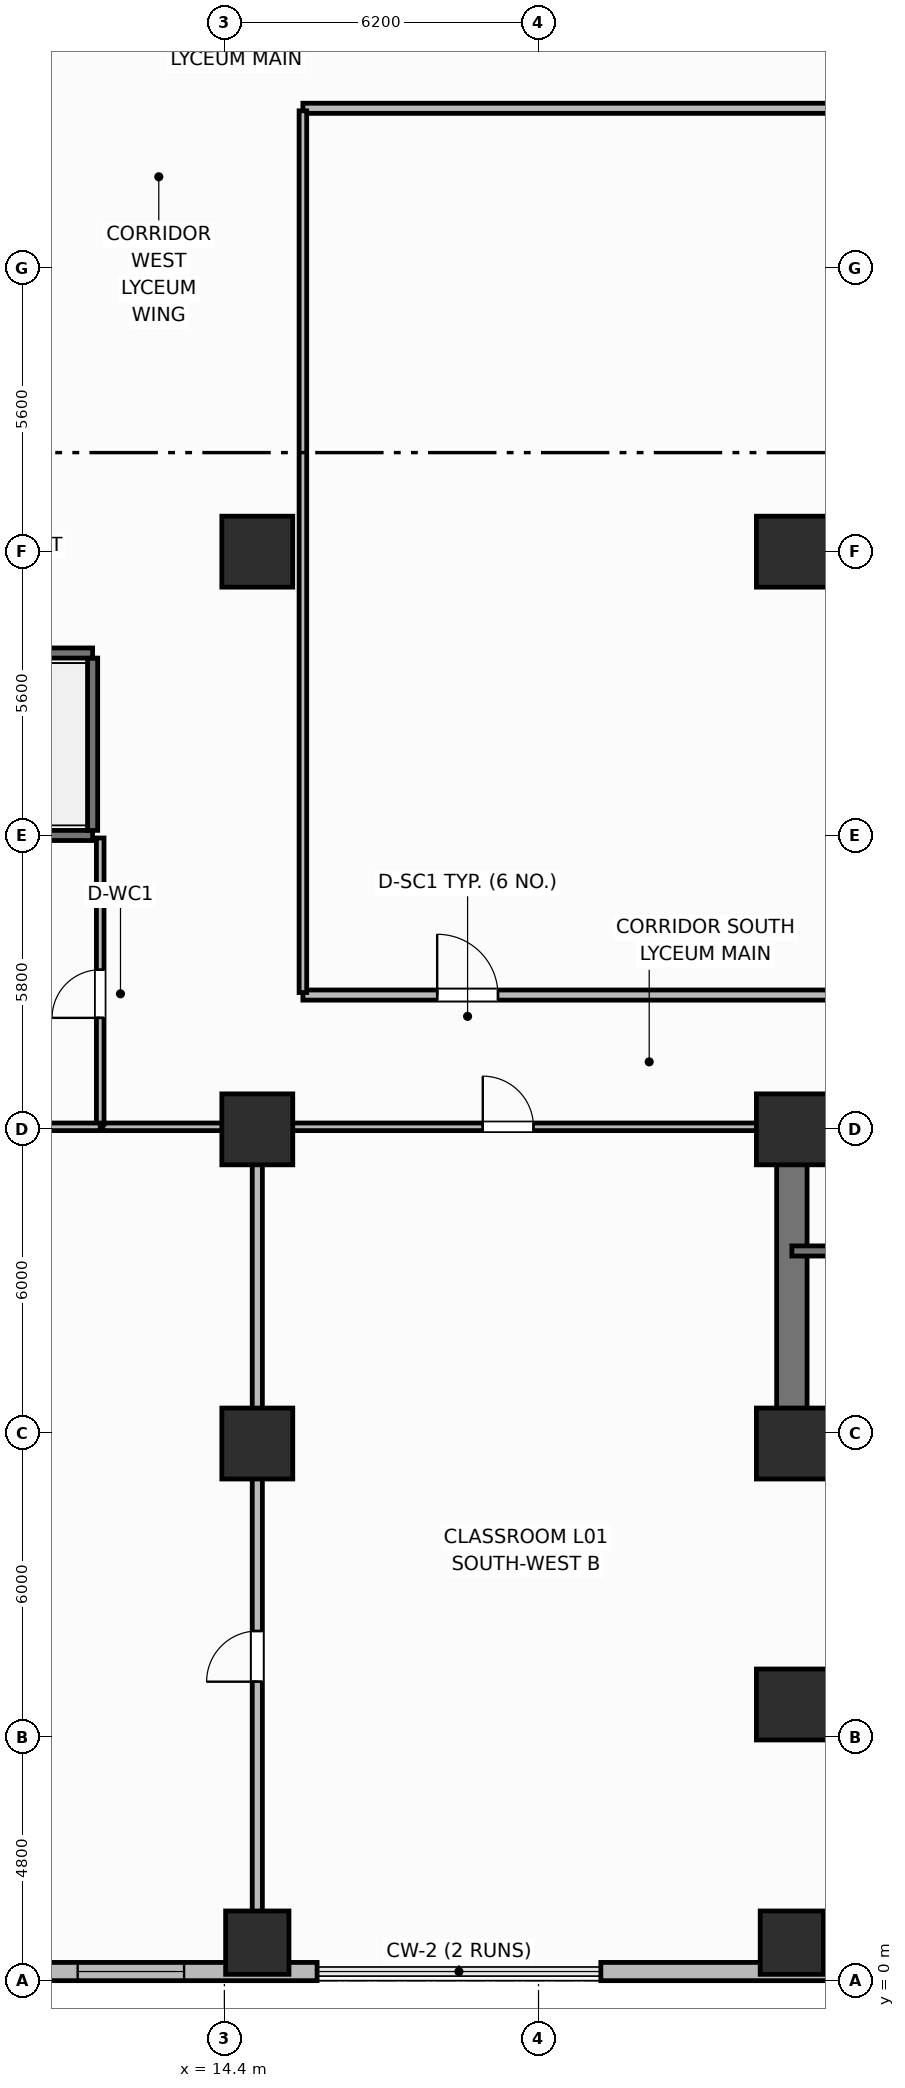
"""IFC4 building model, lengths in metres.
Left out: names, types, materials, properties, quantities, classifications, styles, units other than length and angle.
Written with IfcOpenShell. Run it as: python <this file> out.ifc"""

import sys

from ifc_helpers import new_model, si_unit, direction, frame, frame_2d, origin, origin_2d, place, context, subcontext, project, spatial, rectangle, extrude, element, fill, save


model = new_model("IFC4")
c1 = context("Model", 3, precision=1e-05, world=origin(), true_north=direction((0.0, 1.0)))
c2 = subcontext(c1, "Body", "Model", "MODEL_VIEW")
j1 = project(units=[si_unit("LENGTHUNIT", "METRE"), si_unit("PLANEANGLEUNIT", "RADIAN")], contexts=[c1])
p1 = place(None, origin())
s1 = spatial("IfcSite", under=j1, at=p1, CompositionType="ELEMENT")
p2 = place(p1, origin())
s2 = spatial("IfcBuilding", under=s1, at=p2, CompositionType="ELEMENT")
p3 = place(p2, frame((0.0, 0.0, 6.6)))
s3 = spatial("IfcBuildingStorey", under=s2, at=p3, CompositionType="ELEMENT", Elevation=6.6)
p4 = place(p3, frame((52.8, 10.6, 0.0), z_axis=(0.0, 0.0, 1.0), x_axis=(-1.0, 0.0, 0.0)))
e1 = element("IfcWall", 1, at=p4, inside=s3, PredefinedType="SHEAR", context=c2, shape_type="SweptSolid", body=[
    extrude(rectangle(XDim=27.2, YDim=0.6, at=frame_2d((13.6, 0.0))), origin(), (0.0, 0.0, 1.0), 4.5),
])
p5 = place(p3, frame((25.6, 10.9, 0.0), z_axis=(0.0, 0.0, 1.0), x_axis=(0.0, 1.0, 0.0)))
e2 = element("IfcWall", 2, at=p5, inside=s3, PredefinedType="SHEAR", context=c2, shape_type="SweptSolid", body=[
    extrude(rectangle(XDim=5.6, YDim=0.6, at=frame_2d((2.8, 0.0))), origin(), (0.0, 0.0, 1.0), 4.5),
])
p6 = place(p3, frame((25.6, 16.8, 0.0), z_axis=(0.0, 0.0, 1.0), x_axis=(1.0, 0.0, 0.0)))
e3 = element("IfcWall", 3, at=p6, inside=s3, PredefinedType="SHEAR", context=c2, shape_type="SweptSolid", body=[
    extrude(rectangle(XDim=27.2, YDim=0.6, at=frame_2d((13.6, 0.0))), origin(), (0.0, 0.0, 1.0), 4.5),
])
p7 = place(p6, frame((1.8, 0.0, 0.0)))
e4 = element("IfcOpeningElement", 4, at=p7, cuts=e3, PredefinedType="OPENING", context=c2, shape_type="SweptSolid", body=[
    extrude(rectangle(XDim=1.1, YDim=2.15, at=frame_2d((0.55, 1.075))), frame((0.0, 0.31, 0.0), z_axis=(0.0, -1.0, 0.0), x_axis=(1.0, 0.0, 0.0)), (0.0, 0.0, 1.0), 0.62),
])
p8 = place(p6, frame((5.6, 0.0, 0.0)))
e5 = element("IfcOpeningElement", 5, at=p8, cuts=e3, PredefinedType="OPENING", context=c2, shape_type="SweptSolid", body=[
    extrude(rectangle(XDim=0.85, YDim=2.1, at=frame_2d((0.425, 1.05))), frame((0.0, 0.31, 0.0), z_axis=(0.0, -1.0, 0.0), x_axis=(1.0, 0.0, 0.0)), (0.0, 0.0, 1.0), 0.62),
])
p9 = place(p6, frame((13.0, 0.0, 0.0)))
e6 = element("IfcOpeningElement", 6, at=p9, cuts=e3, PredefinedType="OPENING", context=c2, shape_type="SweptSolid", body=[
    extrude(rectangle(XDim=1.2, YDim=2.15, at=frame_2d((0.6, 1.075))), frame((0.0, 0.31, 0.0), z_axis=(0.0, -1.0, 0.0), x_axis=(1.0, 0.0, 0.0)), (0.0, 0.0, 1.0), 0.62),
])
p10 = place(p6, frame((20.4, 0.0, 0.0)))
e7 = element("IfcOpeningElement", 7, at=p10, cuts=e3, PredefinedType="OPENING", context=c2, shape_type="SweptSolid", body=[
    extrude(rectangle(XDim=1.3, YDim=2.2, at=frame_2d((0.65, 1.1))), frame((0.0, 0.31, 0.0), z_axis=(0.0, -1.0, 0.0), x_axis=(1.0, 0.0, 0.0)), (0.0, 0.0, 1.0), 0.62),
])
p11 = place(p6, frame((24.65, 0.0, 0.0)))
e8 = element("IfcOpeningElement", 8, at=p11, cuts=e3, PredefinedType="OPENING", context=c2, shape_type="SweptSolid", body=[
    extrude(rectangle(XDim=0.85, YDim=2.1, at=frame_2d((0.425, 1.05))), frame((0.0, 0.31, 0.0), z_axis=(0.0, -1.0, 0.0), x_axis=(1.0, 0.0, 0.0)), (0.0, 0.0, 1.0), 0.62),
])
for number, where, z_axis, x_axis in (
    (9, (25.6, 10.6, 0.0), (0.0, 0.0, 1.0), (1.0, 0.0, 0.0)),
    (10, (25.6, 16.8, 0.0), (0.0, 0.0, 1.0), (1.0, 0.0, 0.0)),
    (11, (25.6, 28.2, 0.0), (0.0, 0.0, 1.0), (1.0, 0.0, 0.0)),
):
    element("IfcColumn", number, at=place(p3, frame(where, z_axis=z_axis, x_axis=x_axis)), inside=s3, PredefinedType="COLUMN", context=c2, shape_type="SweptSolid", body=[
        extrude(rectangle(XDim=1.4, YDim=1.4, at=origin_2d()), origin(), (0.0, 0.0, 1.0), 4.5),
    ])
for number, where, z_axis, x_axis in (
    (12, (15.05, 0.75, 0.0), (0.0, 0.0, 1.0), (1.0, 0.0, 0.0)),
    (13, (25.6, 0.75, 0.0), (0.0, 0.0, 1.0), (1.0, 0.0, 0.0)),
):
    element("IfcColumn", number, at=place(p3, frame(where, z_axis=z_axis, x_axis=x_axis)), inside=s3, PredefinedType="COLUMN", context=c2, shape_type="SweptSolid", body=[
        extrude(rectangle(XDim=1.25, YDim=1.25, at=origin_2d()), origin(), (0.0, 0.0, 1.0), 4.5),
    ])
for number, where, z_axis, x_axis in (
    (14, (25.6, 5.45, 0.0), (0.0, 0.0, 1.0), (1.0, 0.0, 0.0)),
    (15, (15.05, 10.6, 0.0), (0.0, 0.0, 1.0), (1.0, 0.0, 0.0)),
    (16, (15.05, 16.8, 0.0), (0.0, 0.0, 1.0), (1.0, 0.0, 0.0)),
    (17, (15.05, 28.2, 0.0), (0.0, 0.0, 1.0), (1.0, 0.0, 0.0)),
):
    element("IfcColumn", number, at=place(p3, frame(where, z_axis=z_axis, x_axis=x_axis)), inside=s3, PredefinedType="COLUMN", context=c2, shape_type="SweptSolid", body=[
        extrude(rectangle(XDim=1.4, YDim=1.4, at=origin_2d()), origin(), (0.0, 0.0, 1.0), 4.5),
    ])
p12 = place(p3, frame((0.98, 0.18, 0.0), z_axis=(0.0, 0.0, 1.0), x_axis=(1.0, 0.0, 0.0)))
e18 = element("IfcWall", 18, at=p12, inside=s3, PredefinedType="SOLIDWALL", context=c2, shape_type="SweptSolid", body=[
    extrude(rectangle(XDim=15.25, YDim=0.36, at=frame_2d((7.625, 0.0))), origin(), (0.0, 0.0, 1.0), 3.48),
])
p13 = place(p12, frame((1.925, 0.0, 0.85)))
e19 = element("IfcOpeningElement", 19, at=p13, cuts=e18, PredefinedType="OPENING", context=c2, shape_type="SweptSolid", body=[
    extrude(rectangle(XDim=2.1, YDim=2.2, at=frame_2d((1.05, 1.1))), frame((0.0, 0.19, 0.0), z_axis=(0.0, -1.0, 0.0), x_axis=(1.0, 0.0, 0.0)), (0.0, 0.0, 1.0), 0.38),
])
p14 = place(p12, frame((7.625, 0.0, 0.85)))
e20 = element("IfcOpeningElement", 20, at=p14, cuts=e18, PredefinedType="OPENING", context=c2, shape_type="SweptSolid", body=[
    extrude(rectangle(XDim=2.1, YDim=2.2, at=frame_2d((1.05, 1.1))), frame((0.0, 0.19, 0.0), z_axis=(0.0, -1.0, 0.0), x_axis=(1.0, 0.0, 0.0)), (0.0, 0.0, 1.0), 0.38),
])
p15 = place(p12, frame((10.525, 0.0, 0.85)))
e21 = element("IfcOpeningElement", 21, at=p15, cuts=e18, PredefinedType="OPENING", context=c2, shape_type="SweptSolid", body=[
    extrude(rectangle(XDim=2.1, YDim=2.2, at=frame_2d((1.05, 1.1))), frame((0.0, 0.19, 0.0), z_axis=(0.0, -1.0, 0.0), x_axis=(1.0, 0.0, 0.0)), (0.0, 0.0, 1.0), 0.38),
])
p16 = place(p3, frame((21.83, 0.18, 0.0), z_axis=(0.0, 0.0, 1.0), x_axis=(1.0, 0.0, 0.0)))
e22 = element("IfcWall", 22, at=p16, inside=s3, PredefinedType="SOLIDWALL", context=c2, shape_type="SweptSolid", body=[
    extrude(rectangle(XDim=55.59, YDim=0.36, at=frame_2d((27.795, 0.0))), origin(), (0.0, 0.0, 1.0), 3.48),
])
p17 = place(p16, frame((5.029, 0.0, 0.85)))
e23 = element("IfcOpeningElement", 23, at=p17, cuts=e22, PredefinedType="OPENING", context=c2, shape_type="SweptSolid", body=[
    extrude(rectangle(XDim=2.1, YDim=2.2, at=frame_2d((1.05, 1.1))), frame((0.0, 0.19, 0.0), z_axis=(0.0, -1.0, 0.0), x_axis=(1.0, 0.0, 0.0)), (0.0, 0.0, 1.0), 0.38),
])
p18 = place(p16, frame((8.648, 0.0, 0.85)))
e24 = element("IfcOpeningElement", 24, at=p18, cuts=e22, PredefinedType="OPENING", context=c2, shape_type="SweptSolid", body=[
    extrude(rectangle(XDim=2.1, YDim=2.2, at=frame_2d((1.05, 1.1))), frame((0.0, 0.19, 0.0), z_axis=(0.0, -1.0, 0.0), x_axis=(1.0, 0.0, 0.0)), (0.0, 0.0, 1.0), 0.38),
])
p19 = place(p16, frame((12.268, 0.0, 0.85)))
e25 = element("IfcOpeningElement", 25, at=p19, cuts=e22, PredefinedType="OPENING", context=c2, shape_type="SweptSolid", body=[
    extrude(rectangle(XDim=2.1, YDim=2.2, at=frame_2d((1.05, 1.1))), frame((0.0, 0.19, 0.0), z_axis=(0.0, -1.0, 0.0), x_axis=(1.0, 0.0, 0.0)), (0.0, 0.0, 1.0), 0.38),
])
p20 = place(p16, frame((19.506, 0.0, 0.85)))
e26 = element("IfcOpeningElement", 26, at=p20, cuts=e22, PredefinedType="OPENING", context=c2, shape_type="SweptSolid", body=[
    extrude(rectangle(XDim=2.1, YDim=2.2, at=frame_2d((1.05, 1.1))), frame((0.0, 0.19, 0.0), z_axis=(0.0, -1.0, 0.0), x_axis=(1.0, 0.0, 0.0)), (0.0, 0.0, 1.0), 0.38),
])
p21 = place(p16, frame((23.126, 0.0, 0.85)))
e27 = element("IfcOpeningElement", 27, at=p21, cuts=e22, PredefinedType="OPENING", context=c2, shape_type="SweptSolid", body=[
    extrude(rectangle(XDim=2.1, YDim=2.2, at=frame_2d((1.05, 1.1))), frame((0.0, 0.19, 0.0), z_axis=(0.0, -1.0, 0.0), x_axis=(1.0, 0.0, 0.0)), (0.0, 0.0, 1.0), 0.38),
])
p22 = place(p16, frame((26.745, 0.0, 0.85)))
e28 = element("IfcOpeningElement", 28, at=p22, cuts=e22, PredefinedType="OPENING", context=c2, shape_type="SweptSolid", body=[
    extrude(rectangle(XDim=2.1, YDim=2.2, at=frame_2d((1.05, 1.1))), frame((0.0, 0.19, 0.0), z_axis=(0.0, -1.0, 0.0), x_axis=(1.0, 0.0, 0.0)), (0.0, 0.0, 1.0), 0.38),
])
p23 = place(p16, frame((33.984, 0.0, 0.85)))
e29 = element("IfcOpeningElement", 29, at=p23, cuts=e22, PredefinedType="OPENING", context=c2, shape_type="SweptSolid", body=[
    extrude(rectangle(XDim=2.1, YDim=2.2, at=frame_2d((1.05, 1.1))), frame((0.0, 0.19, 0.0), z_axis=(0.0, -1.0, 0.0), x_axis=(1.0, 0.0, 0.0)), (0.0, 0.0, 1.0), 0.38),
])
p24 = place(p16, frame((37.603, 0.0, 0.85)))
e30 = element("IfcOpeningElement", 30, at=p24, cuts=e22, PredefinedType="OPENING", context=c2, shape_type="SweptSolid", body=[
    extrude(rectangle(XDim=2.1, YDim=2.2, at=frame_2d((1.05, 1.1))), frame((0.0, 0.19, 0.0), z_axis=(0.0, -1.0, 0.0), x_axis=(1.0, 0.0, 0.0)), (0.0, 0.0, 1.0), 0.38),
])
p25 = place(p16, frame((44.842, 0.0, 0.85)))
e31 = element("IfcOpeningElement", 31, at=p25, cuts=e22, PredefinedType="OPENING", context=c2, shape_type="SweptSolid", body=[
    extrude(rectangle(XDim=2.1, YDim=2.2, at=frame_2d((1.05, 1.1))), frame((0.0, 0.19, 0.0), z_axis=(0.0, -1.0, 0.0), x_axis=(1.0, 0.0, 0.0)), (0.0, 0.0, 1.0), 0.38),
])
p26 = place(p16, frame((52.08, 0.0, 0.85)))
e32 = element("IfcOpeningElement", 32, at=p26, cuts=e22, PredefinedType="OPENING", context=c2, shape_type="SweptSolid", body=[
    extrude(rectangle(XDim=2.1, YDim=2.2, at=frame_2d((1.05, 1.1))), frame((0.0, 0.19, 0.0), z_axis=(0.0, -1.0, 0.0), x_axis=(1.0, 0.0, 0.0)), (0.0, 0.0, 1.0), 0.38),
])
p27 = place(p3, frame((25.6, 14.4, 0.0), z_axis=(0.0, 0.0, 1.0), x_axis=(1.0, 0.0, 0.0)))
e33 = element("IfcWall", 33, at=p27, inside=s3, PredefinedType="SHEAR", context=c2, shape_type="SweptSolid", body=[
    extrude(rectangle(XDim=9.55, YDim=0.2, at=frame_2d((4.775, 0.0))), origin(), (0.0, 0.0, 1.0), 4.5),
])
p28 = place(p27, frame((1.05, 0.0, 0.0)))
e34 = element("IfcOpeningElement", 34, at=p28, cuts=e33, PredefinedType="OPENING", context=c2, shape_type="SweptSolid", body=[
    extrude(rectangle(XDim=1.1, YDim=2.15, at=frame_2d((0.55, 1.075))), frame((0.0, 0.11, 0.0), z_axis=(0.0, -1.0, 0.0), x_axis=(1.0, 0.0, 0.0)), (0.0, 0.0, 1.0), 0.22),
])
p29 = place(p3, frame((2.8, 22.6, 0.0), z_axis=(0.0, 0.0, 1.0), x_axis=(1.0, 0.0, 0.0)))
e35 = element("IfcWall", 35, at=p29, inside=s3, PredefinedType="SHEAR", context=c2, shape_type="SweptSolid", body=[
    extrude(rectangle(XDim=9.0, YDim=0.2, at=frame_2d((4.5, 0.0))), origin(), (0.0, 0.0, 1.0), 4.5),
])
p30 = place(p3, frame((11.8, 22.7, 0.0), z_axis=(0.0, 0.0, 1.0), x_axis=(0.0, 1.0, 0.0)))
e36 = element("IfcWall", 36, at=p30, inside=s3, PredefinedType="SHEAR", context=c2, shape_type="SweptSolid", body=[
    extrude(rectangle(XDim=3.4, YDim=0.2, at=frame_2d((1.7, 0.0))), origin(), (0.0, 0.0, 1.0), 4.5),
])
p31 = place(p3, frame((11.8, 26.2, 0.0), z_axis=(0.0, 0.0, 1.0), x_axis=(-1.0, 0.0, 0.0)))
e37 = element("IfcWall", 37, at=p31, inside=s3, PredefinedType="SHEAR", context=c2, shape_type="SweptSolid", body=[
    extrude(rectangle(XDim=9.0, YDim=0.2, at=frame_2d((4.5, 0.0))), origin(), (0.0, 0.0, 1.0), 4.5),
])
p32 = place(p31, frame((7.05, 0.0, 0.0)))
e38 = element("IfcOpeningElement", 38, at=p32, cuts=e37, PredefinedType="OPENING", context=c2, shape_type="SweptSolid", body=[
    extrude(rectangle(XDim=1.2, YDim=2.15, at=frame_2d((0.6, 1.075))), frame((0.0, 0.11, 0.0), z_axis=(0.0, -1.0, 0.0), x_axis=(1.0, 0.0, 0.0)), (0.0, 0.0, 1.0), 0.22),
])
p33 = place(p3, frame((15.95, 19.45, 0.0), z_axis=(0.0, 0.0, 1.0), x_axis=(1.0, 0.0, 0.0)))
e39 = element("IfcWall", 39, at=p33, inside=s3, PredefinedType="PARTITIONING", context=c2, shape_type="SweptSolid", body=[
    extrude(rectangle(XDim=46.5, YDim=0.2, at=frame_2d((23.25, 0.0))), origin(), (0.0, 0.0, 1.0), 3.42),
])
p34 = place(p33, frame((2.65, 0.0, 0.0)))
e40 = element("IfcOpeningElement", 40, at=p34, cuts=e39, PredefinedType="OPENING", context=c2, shape_type="SweptSolid", body=[
    extrude(rectangle(XDim=1.2, YDim=2.15, at=frame_2d((0.6, 1.075))), frame((0.0, 0.11, 0.0), z_axis=(0.0, -1.0, 0.0), x_axis=(1.0, 0.0, 0.0)), (0.0, 0.0, 1.0), 0.22),
])
p35 = place(p33, frame((22.85, 0.0, 0.0)))
e41 = element("IfcOpeningElement", 41, at=p35, cuts=e39, PredefinedType="OPENING", context=c2, shape_type="SweptSolid", body=[
    extrude(rectangle(XDim=1.2, YDim=2.15, at=frame_2d((0.6, 1.075))), frame((0.0, 0.11, 0.0), z_axis=(0.0, -1.0, 0.0), x_axis=(1.0, 0.0, 0.0)), (0.0, 0.0, 1.0), 0.22),
])
p36 = place(p33, frame((36.65, 0.0, 0.0)))
e42 = element("IfcOpeningElement", 42, at=p36, cuts=e39, PredefinedType="OPENING", context=c2, shape_type="SweptSolid", body=[
    extrude(rectangle(XDim=1.2, YDim=2.15, at=frame_2d((0.6, 1.075))), frame((0.0, 0.11, 0.0), z_axis=(0.0, -1.0, 0.0), x_axis=(1.0, 0.0, 0.0)), (0.0, 0.0, 1.0), 0.22),
])
p37 = place(p3, frame((62.45, 36.95, 0.0), z_axis=(0.0, 0.0, 1.0), x_axis=(-1.0, 0.0, 0.0)))
e43 = element("IfcWall", 43, at=p37, inside=s3, PredefinedType="PARTITIONING", context=c2, shape_type="SweptSolid", body=[
    extrude(rectangle(XDim=46.5, YDim=0.2, at=frame_2d((23.25, 0.0))), origin(), (0.0, 0.0, 1.0), 3.42),
])
p38 = place(p37, frame((29.05, 0.0, 0.0)))
e44 = element("IfcOpeningElement", 44, at=p38, cuts=e43, PredefinedType="OPENING", context=c2, shape_type="SweptSolid", body=[
    extrude(rectangle(XDim=1.2, YDim=2.15, at=frame_2d((0.6, 1.075))), frame((0.0, 0.11, 0.0), z_axis=(0.0, -1.0, 0.0), x_axis=(1.0, 0.0, 0.0)), (0.0, 0.0, 1.0), 0.22),
])
p39 = place(p37, frame((15.25, 0.0, 0.0)))
e45 = element("IfcOpeningElement", 45, at=p39, cuts=e43, PredefinedType="OPENING", context=c2, shape_type="SweptSolid", body=[
    extrude(rectangle(XDim=1.2, YDim=2.15, at=frame_2d((0.6, 1.075))), frame((0.0, 0.11, 0.0), z_axis=(0.0, -1.0, 0.0), x_axis=(1.0, 0.0, 0.0)), (0.0, 0.0, 1.0), 0.22),
])
p40 = place(p37, frame((2.65, 0.0, 0.0)))
e46 = element("IfcOpeningElement", 46, at=p40, cuts=e43, PredefinedType="OPENING", context=c2, shape_type="SweptSolid", body=[
    extrude(rectangle(XDim=1.2, YDim=2.15, at=frame_2d((0.6, 1.075))), frame((0.0, 0.11, 0.0), z_axis=(0.0, -1.0, 0.0), x_axis=(1.0, 0.0, 0.0)), (0.0, 0.0, 1.0), 0.22),
])
p41 = place(p3, frame((15.95, 19.5, 0.0), z_axis=(0.0, 0.0, 1.0), x_axis=(0.0, 1.0, 0.0)))
e47 = element("IfcWall", 47, at=p41, inside=s3, PredefinedType="PARTITIONING", context=c2, shape_type="SweptSolid", body=[
    extrude(rectangle(XDim=17.4, YDim=0.15, at=frame_2d((8.7, 0.0))), origin(), (0.0, 0.0, 1.0), 3.42),
])
p42 = place(p3, frame((15.05, 0.4, 0.0), z_axis=(0.0, 0.0, 1.0), x_axis=(0.0, 1.0, 0.0)))
e48 = element("IfcWall", 48, at=p42, inside=s3, PredefinedType="PARTITIONING", context=c2, shape_type="SweptSolid", body=[
    extrude(rectangle(XDim=16.4, YDim=0.2, at=frame_2d((8.2, 0.0))), origin(), (0.0, 0.0, 1.0), 3.42),
])
p43 = place(p42, frame((5.5, 0.0, 0.0)))
e49 = element("IfcOpeningElement", 49, at=p43, cuts=e48, PredefinedType="OPENING", context=c2, shape_type="SweptSolid", body=[
    extrude(rectangle(XDim=1.0, YDim=2.15, at=frame_2d((0.5, 1.075))), frame((0.0, 0.11, 0.0), z_axis=(0.0, -1.0, 0.0), x_axis=(1.0, 0.0, 0.0)), (0.0, 0.0, 1.0), 0.22),
])
p44 = place(p3, frame((12.0, 16.85, 0.0), z_axis=(0.0, 0.0, 1.0), x_axis=(1.0, 0.0, 0.0)))
e50 = element("IfcWall", 50, at=p44, inside=s3, PredefinedType="PARTITIONING", context=c2, shape_type="SweptSolid", body=[
    extrude(rectangle(XDim=13.25, YDim=0.15, at=frame_2d((6.625, 0.0))), origin(), (0.0, 0.0, 1.0), 3.42),
])
p45 = place(p44, frame((7.5, 0.0, 0.0)))
e51 = element("IfcOpeningElement", 51, at=p45, cuts=e50, PredefinedType="OPENING", context=c2, shape_type="SweptSolid", body=[
    extrude(rectangle(XDim=1.0, YDim=2.15, at=frame_2d((0.5, 1.075))), frame((0.0, 0.085, 0.0), z_axis=(0.0, -1.0, 0.0), x_axis=(1.0, 0.0, 0.0)), (0.0, 0.0, 1.0), 0.17),
])
p46 = place(p3, frame((11.95, 16.9, 0.0), z_axis=(0.0, 0.0, 1.0), x_axis=(0.0, 1.0, 0.0)))
e52 = element("IfcWall", 52, at=p46, inside=s3, PredefinedType="PARTITIONING", context=c2, shape_type="SweptSolid", body=[
    extrude(rectangle(XDim=5.65, YDim=0.15, at=frame_2d((2.825, 0.0))), origin(), (0.0, 0.0, 1.0), 3.42),
])
p47 = place(p46, frame((2.1, 0.0, 0.0)))
e53 = element("IfcOpeningElement", 53, at=p47, cuts=e52, PredefinedType="OPENING", context=c2, shape_type="SweptSolid", body=[
    extrude(rectangle(XDim=0.95, YDim=2.1, at=frame_2d((0.475, 1.05))), frame((0.0, 0.085, 0.0), z_axis=(0.0, -1.0, 0.0), x_axis=(1.0, 0.0, 0.0)), (0.0, 0.0, 1.0), 0.17),
])
p48 = place(p3, frame((0.4, 16.85, 0.0), z_axis=(0.0, 0.0, 1.0), x_axis=(1.0, 0.0, 0.0)))
e54 = element("IfcWall", 54, at=p48, inside=s3, PredefinedType="PARTITIONING", context=c2, shape_type="SweptSolid", body=[
    extrude(rectangle(XDim=11.55, YDim=0.15, at=frame_2d((5.775, 0.0))), origin(), (0.0, 0.0, 1.0), 3.42),
])
p49 = place(p15, origin())
e55 = element("IfcWindow", 55, at=p49, inside=s3, PartitioningType="SINGLE_PANEL", PredefinedType="WINDOW", context=c2, shape_type="SweptSolid", body=[
    extrude(rectangle(XDim=2.1, YDim=2.2, at=frame_2d((1.05, 1.1))), frame((0.0, 0.03, 0.0), z_axis=(0.0, -1.0, 0.0), x_axis=(1.0, 0.0, 0.0)), (0.0, 0.0, 1.0), 0.06),
])
fill(e21, e55)
p50 = place(p34, origin())
e56 = element("IfcDoor", 56, at=p50, inside=s3, OperationType="SINGLE_SWING_LEFT", PredefinedType="DOOR", context=c2, shape_type="SweptSolid", body=[
    extrude(rectangle(XDim=1.2, YDim=2.15, at=frame_2d((0.6, 1.075))), frame((0.0, 0.025, 0.0), z_axis=(0.0, -1.0, 0.0), x_axis=(1.0, 0.0, 0.0)), (0.0, 0.0, 1.0), 0.05),
])
fill(e40, e56)
p51 = place(p43, origin())
e57 = element("IfcDoor", 57, at=p51, inside=s3, OperationType="SINGLE_SWING_LEFT", PredefinedType="DOOR", context=c2, shape_type="SweptSolid", body=[
    extrude(rectangle(XDim=1.0, YDim=2.15, at=frame_2d((0.5, 1.075))), frame((0.0, 0.025, 0.0), z_axis=(0.0, -1.0, 0.0), x_axis=(1.0, 0.0, 0.0)), (0.0, 0.0, 1.0), 0.05),
])
fill(e49, e57)
p52 = place(p45, origin())
e58 = element("IfcDoor", 58, at=p52, inside=s3, OperationType="SINGLE_SWING_LEFT", PredefinedType="DOOR", context=c2, shape_type="SweptSolid", body=[
    extrude(rectangle(XDim=1.0, YDim=2.15, at=frame_2d((0.5, 1.075))), frame((0.0, 0.025, 0.0), z_axis=(0.0, -1.0, 0.0), x_axis=(1.0, 0.0, 0.0)), (0.0, 0.0, 1.0), 0.05),
])
fill(e51, e58)
p53 = place(p47, origin())
e59 = element("IfcDoor", 59, at=p53, inside=s3, OperationType="SINGLE_SWING_LEFT", PredefinedType="DOOR", context=c2, shape_type="SweptSolid", body=[
    extrude(rectangle(XDim=0.95, YDim=2.1, at=frame_2d((0.475, 1.05))), frame((0.0, 0.025, 0.0), z_axis=(0.0, -1.0, 0.0), x_axis=(1.0, 0.0, 0.0)), (0.0, 0.0, 1.0), 0.05),
])
fill(e53, e59)
save(model, sys.argv[1])
